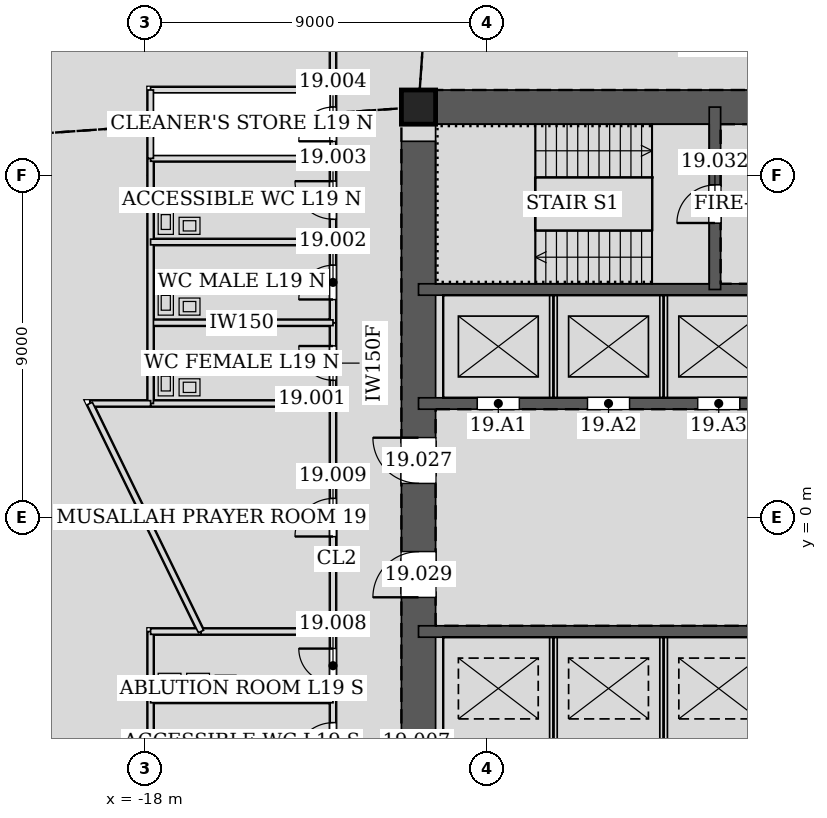
"""IFC4 building model, lengths in metres.
Left out: names, types, materials, properties, quantities, classifications, styles, units other than length and angle.
Written with IfcOpenShell. Run it as: python <this file> out.ifc"""

import sys

from ifc_helpers import new_model, si_unit, direction, frame, frame_2d, origin, origin_2d, place, context, subcontext, project, spatial, rectangle, hollow_rectangle, extrude, element, fill, save


model = new_model("IFC4")
c1 = context("Model", 3, precision=1e-05, world=origin(), true_north=direction((0.0, 1.0)))
c2 = subcontext(c1, "Body", "Model", "MODEL_VIEW")
j1 = project(units=[si_unit("LENGTHUNIT", "METRE"), si_unit("PLANEANGLEUNIT", "RADIAN")], contexts=[c1])
p1 = place(None, origin())
s1 = spatial("IfcSite", under=j1, at=p1, CompositionType="ELEMENT")
p2 = place(p1, origin())
s2 = spatial("IfcBuilding", under=s1, at=p2, CompositionType="ELEMENT")
p3 = place(p2, frame((0.0, 0.0, 87.6)))
s3 = spatial("IfcBuildingStorey", under=s2, at=p3, CompositionType="ELEMENT", Elevation=87.6)
p4 = place(p3, frame((-10.8, 10.8, 0.0), z_axis=(0.0, 0.0, 1.0), x_axis=(1.0, 0.0, 0.0)))
e1 = element("IfcColumn", 1, at=p4, inside=s3, PredefinedType="COLUMN", context=c2, shape_type="SweptSolid", body=[
    extrude(hollow_rectangle(XDim=0.9, YDim=0.9, WallThickness=0.06, at=origin_2d()), origin(), (0.0, 0.0, 1.0), 4.2),
])
p5 = place(p3, frame((10.8, 10.8, 0.0), z_axis=(0.0, 0.0, 1.0), x_axis=(-1.0, 0.0, 0.0)))
e2 = element("IfcWall", 2, at=p5, inside=s3, PredefinedType="SOLIDWALL", context=c2, shape_type="SweptSolid", body=[
    extrude(rectangle(XDim=21.6, YDim=0.9, at=frame_2d((10.8, 0.0))), origin(), (0.0, 0.0, 1.0), 4.2),
])
p6 = place(p5, frame((10.05, 0.0, 0.0)))
e3 = element("IfcOpeningElement", 3, at=p6, cuts=e2, PredefinedType="OPENING", context=c2, shape_type="SweptSolid", body=[
    extrude(rectangle(XDim=1.5, YDim=2.1, at=frame_2d((0.75, 1.05))), frame((0.0, 0.46, 0.0), z_axis=(0.0, -1.0, 0.0), x_axis=(1.0, 0.0, 0.0)), (0.0, 0.0, 1.0), 0.92),
])
p7 = place(p3, frame((-10.8, 10.8, 0.0), z_axis=(0.0, 0.0, 1.0), x_axis=(0.0, -1.0, 0.0)))
e4 = element("IfcWall", 4, at=p7, inside=s3, PredefinedType="SOLIDWALL", context=c2, shape_type="SweptSolid", body=[
    extrude(rectangle(XDim=21.6, YDim=0.9, at=frame_2d((10.8, 0.0))), origin(), (0.0, 0.0, 1.0), 4.2),
])
p8 = place(p7, frame((8.7, 0.0, 0.0)))
e5 = element("IfcOpeningElement", 5, at=p8, cuts=e4, PredefinedType="OPENING", context=c2, shape_type="SweptSolid", body=[
    extrude(rectangle(XDim=1.2, YDim=2.1, at=frame_2d((0.6, 1.05))), frame((0.0, 0.46, 0.0), z_axis=(0.0, -1.0, 0.0), x_axis=(1.0, 0.0, 0.0)), (0.0, 0.0, 1.0), 0.92),
])
p9 = place(p7, frame((11.7, 0.0, 0.0)))
e6 = element("IfcOpeningElement", 6, at=p9, cuts=e4, PredefinedType="OPENING", context=c2, shape_type="SweptSolid", body=[
    extrude(rectangle(XDim=1.2, YDim=2.1, at=frame_2d((0.6, 1.05))), frame((0.0, 0.46, 0.0), z_axis=(0.0, -1.0, 0.0), x_axis=(1.0, 0.0, 0.0)), (0.0, 0.0, 1.0), 0.92),
])
p10 = place(p3, frame((-10.8, 3.0, 0.0), z_axis=(0.0, 0.0, 1.0), x_axis=(1.0, 0.0, 0.0)))
e7 = element("IfcWall", 7, at=p10, inside=s3, PredefinedType="SOLIDWALL", context=c2, shape_type="SweptSolid", body=[
    extrude(rectangle(XDim=21.6, YDim=0.3, at=frame_2d((10.8, 0.0))), origin(), (0.0, 0.0, 1.0), 4.2),
])
p11 = place(p10, frame((1.55, 0.0, 0.0)))
e8 = element("IfcOpeningElement", 8, at=p11, cuts=e7, PredefinedType="OPENING", context=c2, shape_type="SweptSolid", body=[
    extrude(rectangle(XDim=1.1, YDim=2.1, at=frame_2d((0.55, 1.05))), frame((0.0, 0.16, 0.0), z_axis=(0.0, -1.0, 0.0), x_axis=(1.0, 0.0, 0.0)), (0.0, 0.0, 1.0), 0.32),
])
p12 = place(p10, frame((4.45, 0.0, 0.0)))
e9 = element("IfcOpeningElement", 9, at=p12, cuts=e7, PredefinedType="OPENING", context=c2, shape_type="SweptSolid", body=[
    extrude(rectangle(XDim=1.1, YDim=2.1, at=frame_2d((0.55, 1.05))), frame((0.0, 0.16, 0.0), z_axis=(0.0, -1.0, 0.0), x_axis=(1.0, 0.0, 0.0)), (0.0, 0.0, 1.0), 0.32),
])
p13 = place(p10, frame((7.35, 0.0, 0.0)))
e10 = element("IfcOpeningElement", 10, at=p13, cuts=e7, PredefinedType="OPENING", context=c2, shape_type="SweptSolid", body=[
    extrude(rectangle(XDim=1.1, YDim=2.1, at=frame_2d((0.55, 1.05))), frame((0.0, 0.16, 0.0), z_axis=(0.0, -1.0, 0.0), x_axis=(1.0, 0.0, 0.0)), (0.0, 0.0, 1.0), 0.32),
])
p14 = place(p10, frame((13.15, 0.0, 0.0)))
e11 = element("IfcOpeningElement", 11, at=p14, cuts=e7, PredefinedType="OPENING", context=c2, shape_type="SweptSolid", body=[
    extrude(rectangle(XDim=1.1, YDim=2.1, at=frame_2d((0.55, 1.05))), frame((0.0, 0.16, 0.0), z_axis=(0.0, -1.0, 0.0), x_axis=(1.0, 0.0, 0.0)), (0.0, 0.0, 1.0), 0.32),
])
p15 = place(p3, frame((-10.8, 6.0, 0.0), z_axis=(0.0, 0.0, 1.0), x_axis=(1.0, 0.0, 0.0)))
e12 = element("IfcWall", 12, at=p15, inside=s3, PredefinedType="SOLIDWALL", context=c2, shape_type="SweptSolid", body=[
    extrude(rectangle(XDim=21.6, YDim=0.3, at=frame_2d((10.8, 0.0))), origin(), (0.0, 0.0, 1.0), 4.2),
])
p16 = place(p15, frame((10.25, 0.0, 0.0)))
e13 = element("IfcOpeningElement", 13, at=p16, cuts=e12, PredefinedType="OPENING", context=c2, shape_type="SweptSolid", body=[
    extrude(rectangle(XDim=1.1, YDim=2.1, at=frame_2d((0.55, 1.05))), frame((0.0, 0.16, 0.0), z_axis=(0.0, -1.0, 0.0), x_axis=(1.0, 0.0, 0.0)), (0.0, 0.0, 1.0), 0.32),
])
p17 = place(p3, frame((-3.0, 6.0, 0.0), z_axis=(0.0, 0.0, 1.0), x_axis=(0.0, 1.0, 0.0)))
e14 = element("IfcWall", 14, at=p17, inside=s3, PredefinedType="SOLIDWALL", context=c2, shape_type="SweptSolid", body=[
    extrude(rectangle(XDim=4.8, YDim=0.3, at=frame_2d((2.4, 0.0))), origin(), (0.0, 0.0, 1.0), 4.2),
])
p18 = place(p17, frame((1.75, 0.0, 0.0)))
e15 = element("IfcOpeningElement", 15, at=p18, cuts=e14, PredefinedType="OPENING", context=c2, shape_type="SweptSolid", body=[
    extrude(rectangle(XDim=1.0, YDim=2.1, at=frame_2d((0.5, 1.05))), frame((0.0, 0.16, 0.0), z_axis=(0.0, -1.0, 0.0), x_axis=(1.0, 0.0, 0.0)), (0.0, 0.0, 1.0), 0.32),
])
p19 = place(p3, frame((-10.8, -3.0, 0.0), z_axis=(0.0, 0.0, 1.0), x_axis=(1.0, 0.0, 0.0)))
e16 = element("IfcWall", 16, at=p19, inside=s3, PredefinedType="SOLIDWALL", context=c2, shape_type="SweptSolid", body=[
    extrude(rectangle(XDim=21.6, YDim=0.3, at=frame_2d((10.8, 0.0))), origin(), (0.0, 0.0, 1.0), 4.2),
])
p20 = place(p3, frame((-13.05, 5.126, 0.0), z_axis=(0.0, 0.0, 1.0), x_axis=(0.0, -1.0, 0.0)))
e17 = element("IfcWall", 17, at=p20, inside=s3, PredefinedType="PARTITIONING", context=c2, shape_type="SweptSolid", body=[
    extrude(rectangle(XDim=2.127, YDim=0.15, at=frame_2d((1.063, 0.0))), origin(), (0.0, 0.0, 1.0), 4.035),
])
p21 = place(p20, frame((0.614, 0.0, 0.0)))
e18 = element("IfcOpeningElement", 18, at=p21, cuts=e17, PredefinedType="OPENING", context=c2, shape_type="SweptSolid", body=[
    extrude(rectangle(XDim=0.9, YDim=2.1, at=frame_2d((0.45, 1.05))), frame((0.0, 0.085, 0.0), z_axis=(0.0, -1.0, 0.0), x_axis=(1.0, 0.0, 0.0)), (0.0, 0.0, 1.0), 0.17),
])
p22 = place(p3, frame((-13.05, 7.251, 0.0), z_axis=(0.0, 0.0, 1.0), x_axis=(0.0, -1.0, 0.0)))
e19 = element("IfcWall", 19, at=p22, inside=s3, PredefinedType="PARTITIONING", context=c2, shape_type="SweptSolid", body=[
    extrude(rectangle(XDim=2.127, YDim=0.15, at=frame_2d((1.063, 0.0))), origin(), (0.0, 0.0, 1.0), 4.035),
])
p23 = place(p22, frame((0.614, 0.0, 0.0)))
e20 = element("IfcOpeningElement", 20, at=p23, cuts=e19, PredefinedType="OPENING", context=c2, shape_type="SweptSolid", body=[
    extrude(rectangle(XDim=0.9, YDim=2.1, at=frame_2d((0.45, 1.05))), frame((0.0, 0.085, 0.0), z_axis=(0.0, -1.0, 0.0), x_axis=(1.0, 0.0, 0.0)), (0.0, 0.0, 1.0), 0.17),
])
p24 = place(p3, frame((-13.05, 9.451, 0.0), z_axis=(0.0, 0.0, 1.0), x_axis=(0.0, -1.0, 0.0)))
e21 = element("IfcWall", 21, at=p24, inside=s3, PredefinedType="PARTITIONING", context=c2, shape_type="SweptSolid", body=[
    extrude(rectangle(XDim=2.202, YDim=0.15, at=frame_2d((1.101, 0.0))), origin(), (0.0, 0.0, 1.0), 4.035),
])
p25 = place(p24, frame((0.601, 0.0, 0.0)))
e22 = element("IfcOpeningElement", 22, at=p25, cuts=e21, PredefinedType="OPENING", context=c2, shape_type="SweptSolid", body=[
    extrude(rectangle(XDim=1.0, YDim=2.1, at=frame_2d((0.5, 1.05))), frame((0.0, 0.085, 0.0), z_axis=(0.0, -1.0, 0.0), x_axis=(1.0, 0.0, 0.0)), (0.0, 0.0, 1.0), 0.17),
])
p26 = place(p3, frame((-13.05, 11.251, 0.0), z_axis=(0.0, 0.0, 1.0), x_axis=(0.0, -1.0, 0.0)))
e23 = element("IfcWall", 23, at=p26, inside=s3, PredefinedType="PARTITIONING", context=c2, shape_type="SweptSolid", body=[
    extrude(rectangle(XDim=1.802, YDim=0.15, at=frame_2d((0.901, 0.0))), origin(), (0.0, 0.0, 1.0), 3.014),
])
p27 = place(p26, frame((0.451, 0.0, 0.0)))
e24 = element("IfcOpeningElement", 24, at=p27, cuts=e23, PredefinedType="OPENING", context=c2, shape_type="SweptSolid", body=[
    extrude(rectangle(XDim=0.9, YDim=2.1, at=frame_2d((0.45, 1.05))), frame((0.0, 0.085, 0.0), z_axis=(0.0, -1.0, 0.0), x_axis=(1.0, 0.0, 0.0)), (0.0, 0.0, 1.0), 0.17),
])
p28 = place(p3, frame((-13.05, -4.799, 0.0), z_axis=(0.0, 0.0, 1.0), x_axis=(0.0, -1.0, 0.0)))
e25 = element("IfcWall", 25, at=p28, inside=s3, PredefinedType="PARTITIONING", context=c2, shape_type="SweptSolid", body=[
    extrude(rectangle(XDim=2.202, YDim=0.15, at=frame_2d((1.101, 0.0))), origin(), (0.0, 0.0, 1.0), 4.035),
])
p29 = place(p28, frame((0.601, 0.0, 0.0)))
e26 = element("IfcOpeningElement", 26, at=p29, cuts=e25, PredefinedType="OPENING", context=c2, shape_type="SweptSolid", body=[
    extrude(rectangle(XDim=1.0, YDim=2.1, at=frame_2d((0.5, 1.05))), frame((0.0, 0.085, 0.0), z_axis=(0.0, -1.0, 0.0), x_axis=(1.0, 0.0, 0.0)), (0.0, 0.0, 1.0), 0.17),
])
p30 = place(p3, frame((-13.05, -2.999, 0.0), z_axis=(0.0, 0.0, 1.0), x_axis=(0.0, -1.0, 0.0)))
e27 = element("IfcWall", 27, at=p30, inside=s3, PredefinedType="PARTITIONING", context=c2, shape_type="SweptSolid", body=[
    extrude(rectangle(XDim=1.802, YDim=0.15, at=frame_2d((0.901, 0.0))), origin(), (0.0, 0.0, 1.0), 4.035),
])
p31 = place(p30, frame((0.451, 0.0, 0.0)))
e28 = element("IfcOpeningElement", 28, at=p31, cuts=e27, PredefinedType="OPENING", context=c2, shape_type="SweptSolid", body=[
    extrude(rectangle(XDim=0.9, YDim=2.1, at=frame_2d((0.45, 1.05))), frame((0.0, 0.085, 0.0), z_axis=(0.0, -1.0, 0.0), x_axis=(1.0, 0.0, 0.0)), (0.0, 0.0, 1.0), 0.17),
])
p32 = place(p3, frame((-13.05, 3.001, 0.0), z_axis=(0.0, 0.0, 1.0), x_axis=(0.0, -1.0, 0.0)))
e29 = element("IfcWall", 29, at=p32, inside=s3, PredefinedType="PARTITIONING", context=c2, shape_type="SweptSolid", body=[
    extrude(rectangle(XDim=6.002, YDim=0.15, at=frame_2d((3.001, 0.0))), origin(), (0.0, 0.0, 1.0), 3.065),
])
p33 = place(p32, frame((2.501, 0.0, 0.0)))
e30 = element("IfcOpeningElement", 30, at=p33, cuts=e29, PredefinedType="OPENING", context=c2, shape_type="SweptSolid", body=[
    extrude(rectangle(XDim=1.0, YDim=2.1, at=frame_2d((0.5, 1.05))), frame((0.0, 0.085, 0.0), z_axis=(0.0, -1.0, 0.0), x_axis=(1.0, 0.0, 0.0)), (0.0, 0.0, 1.0), 0.17),
])
p34 = place(p3, frame((-13.05, 13.05, 0.0), z_axis=(0.0, 0.0, 1.0), x_axis=(0.0, -1.0, 0.0)))
e31 = element("IfcWall", 31, at=p34, inside=s3, PredefinedType="PARTITIONING", context=c2, shape_type="SweptSolid", body=[
    extrude(rectangle(XDim=1.801, YDim=0.15, at=frame_2d((0.9, 0.0))), origin(), (0.0, 0.0, 1.0), 3.179),
])
for number, where, z_axis, x_axis in (
    (32, (-13.05, 5.125, 0.0), (0.0, 0.0, 1.0), (-1.0, 0.0, 0.0)),
    (33, (-17.85, 3.0, 0.0), (0.0, 0.0, 1.0), (1.0, 0.0, 0.0)),
):
    element("IfcWall", number, at=place(p3, frame(where, z_axis=z_axis, x_axis=x_axis)), inside=s3, PredefinedType="PARTITIONING", context=c2, shape_type="SweptSolid", body=[
        extrude(rectangle(XDim=4.8, YDim=0.15, at=frame_2d((2.4, 0.0))), origin(), (0.0, 0.0, 1.0), 3.491),
    ])
p35 = place(p3, frame((-17.85, 3.0, 0.0), z_axis=(0.0, 0.0, 1.0), x_axis=(0.0, 1.0, 0.0)))
e34 = element("IfcWall", 34, at=p35, inside=s3, PredefinedType="PARTITIONING", context=c2, shape_type="SweptSolid", body=[
    extrude(rectangle(XDim=6.45, YDim=0.15, at=frame_2d((3.225, 0.0))), origin(), (0.0, 0.0, 1.0), 4.035),
])
for number, where, z_axis, x_axis in (
    (35, (-13.05, 7.25, 0.0), (0.0, 0.0, 1.0), (-1.0, 0.0, 0.0)),
    (36, (-13.05, 9.45, 0.0), (0.0, 0.0, 1.0), (-1.0, 0.0, 0.0)),
):
    element("IfcWall", number, at=place(p3, frame(where, z_axis=z_axis, x_axis=x_axis)), inside=s3, PredefinedType="PARTITIONING", context=c2, shape_type="SweptSolid", body=[
        extrude(rectangle(XDim=4.8, YDim=0.15, at=frame_2d((2.4, 0.0))), origin(), (0.0, 0.0, 1.0), 3.491),
    ])
p36 = place(p3, frame((-13.05, 11.25, 0.0), z_axis=(0.0, 0.0, 1.0), x_axis=(-1.0, 0.0, 0.0)))
e37 = element("IfcWall", 37, at=p36, inside=s3, PredefinedType="PARTITIONING", context=c2, shape_type="SweptSolid", body=[
    extrude(rectangle(XDim=4.8, YDim=0.15, at=frame_2d((2.4, 0.0))), origin(), (0.0, 0.0, 1.0), 3.715),
])
p37 = place(p3, frame((-17.85, 11.25, 0.0), z_axis=(0.0, 0.0, 1.0), x_axis=(0.0, -1.0, 0.0)))
e38 = element("IfcWall", 38, at=p37, inside=s3, PredefinedType="PARTITIONING", context=c2, shape_type="SweptSolid", body=[
    extrude(rectangle(XDim=1.8, YDim=0.15, at=frame_2d((0.9, 0.0))), origin(), (0.0, 0.0, 1.0), 3.014),
])
p38 = place(p3, frame((-17.85, -9.125, 0.0), z_axis=(0.0, 0.0, 1.0), x_axis=(0.0, 1.0, 0.0)))
e39 = element("IfcWall", 39, at=p38, inside=s3, PredefinedType="PARTITIONING", context=c2, shape_type="SweptSolid", body=[
    extrude(rectangle(XDim=6.125, YDim=0.15, at=frame_2d((3.062, 0.0))), origin(), (0.0, 0.0, 1.0), 4.035),
])
p39 = place(p3, frame((-13.05, -4.8, 0.0), z_axis=(0.0, 0.0, 1.0), x_axis=(-1.0, 0.0, 0.0)))
e40 = element("IfcWall", 40, at=p39, inside=s3, PredefinedType="PARTITIONING", context=c2, shape_type="SweptSolid", body=[
    extrude(rectangle(XDim=4.8, YDim=0.15, at=frame_2d((2.4, 0.0))), origin(), (0.0, 0.0, 1.0), 3.491),
])
p40 = place(p3, frame((-13.05, -3.0, 0.0), z_axis=(0.0, 0.0, 1.0), x_axis=(-1.0, 0.0, 0.0)))
e41 = element("IfcWall", 41, at=p40, inside=s3, PredefinedType="PARTITIONING", context=c2, shape_type="SweptSolid", body=[
    extrude(rectangle(XDim=3.475, YDim=0.15, at=frame_2d((1.737, 0.0))), origin(), (0.0, 0.0, 1.0), 3.491),
])
p41 = place(p3, frame((-16.522, -3.0, 0.0), z_axis=(0.0, 0.0, 1.0), x_axis=(-1.0, 0.0, 0.0)))
e42 = element("IfcWall", 42, at=p41, inside=s3, PredefinedType="PARTITIONING", context=c2, shape_type="SweptSolid", body=[
    extrude(rectangle(XDim=1.328, YDim=0.15, at=frame_2d((0.664, 0.0))), origin(), (0.0, 0.0, 1.0), 4.035),
])
p42 = place(p3, frame((-17.849, 3.0, 0.0), z_axis=(0.0, 0.0, 1.0), x_axis=(-1.0, 0.0, 0.0)))
e43 = element("IfcWall", 43, at=p42, inside=s3, PredefinedType="PARTITIONING", context=c2, shape_type="SweptSolid", body=[
    extrude(rectangle(XDim=1.601, YDim=0.15, at=frame_2d((0.8, 0.0))), origin(), (0.0, 0.0, 1.0), 3.497),
])
p43 = place(p3, frame((-19.45, 3.0, 0.0), z_axis=(0.0, 0.0, 1.0), x_axis=(0.43835589904, -0.898801482963, 0.0)))
e44 = element("IfcWall", 44, at=p43, inside=s3, PredefinedType="PARTITIONING", context=c2, shape_type="SweptSolid", body=[
    extrude(rectangle(XDim=6.676, YDim=0.15, at=frame_2d((3.338, 0.0))), origin(), (0.0, 0.0, 1.0), 3.065),
])
for number, where, z_axis, x_axis in (
    (45, (-7.25, 3.15, 0.0), (0.0, 0.0, 1.0), (0.0, 1.0, 0.0)),
    (46, (-4.35, 3.15, 0.0), (0.0, 0.0, 1.0), (0.0, 1.0, 0.0)),
    (47, (-7.25, -5.85, 0.0), (0.0, 0.0, 1.0), (0.0, 1.0, 0.0)),
    (48, (-4.35, -5.85, 0.0), (0.0, 0.0, 1.0), (0.0, 1.0, 0.0)),
):
    element("IfcWall", number, at=place(p3, frame(where, z_axis=z_axis, x_axis=x_axis)), inside=s3, PredefinedType="PARTITIONING", context=c2, shape_type="SweptSolid", body=[
        extrude(rectangle(XDim=2.7, YDim=0.2, at=frame_2d((1.35, 0.0))), origin(), (0.0, 0.0, 1.0), 4.2),
    ])
p44 = place(p21, frame((0.9, 0.0, 0.0), z_axis=(0.0, 0.0, 1.0), x_axis=(-1.0, 0.0, 0.0)))
e49 = element("IfcDoor", 49, at=p44, inside=s3, OperationType="SINGLE_SWING_RIGHT", PredefinedType="DOOR", context=c2, shape_type="SweptSolid", body=[
    extrude(rectangle(XDim=0.9, YDim=2.1, at=frame_2d((0.45, 1.05))), frame((0.0, 0.025, 0.0), z_axis=(0.0, -1.0, 0.0), x_axis=(1.0, 0.0, 0.0)), (0.0, 0.0, 1.0), 0.05),
])
fill(e18, e49)
p45 = place(p23, frame((0.9, 0.0, 0.0), z_axis=(0.0, 0.0, 1.0), x_axis=(-1.0, 0.0, 0.0)))
e50 = element("IfcDoor", 50, at=p45, inside=s3, OperationType="SINGLE_SWING_LEFT", PredefinedType="DOOR", context=c2, shape_type="SweptSolid", body=[
    extrude(rectangle(XDim=0.9, YDim=2.1, at=frame_2d((0.45, 1.05))), frame((0.0, 0.025, 0.0), z_axis=(0.0, -1.0, 0.0), x_axis=(1.0, 0.0, 0.0)), (0.0, 0.0, 1.0), 0.05),
])
fill(e20, e50)
p46 = place(p25, frame((1.0, 0.0, 0.0), z_axis=(0.0, 0.0, 1.0), x_axis=(-1.0, 0.0, 0.0)))
e51 = element("IfcDoor", 51, at=p46, inside=s3, OperationType="SINGLE_SWING_RIGHT", PredefinedType="DOOR", context=c2, shape_type="SweptSolid", body=[
    extrude(rectangle(XDim=1.0, YDim=2.1, at=frame_2d((0.5, 1.05))), frame((0.0, 0.025, 0.0), z_axis=(0.0, -1.0, 0.0), x_axis=(1.0, 0.0, 0.0)), (0.0, 0.0, 1.0), 0.05),
])
fill(e22, e51)
p47 = place(p27, frame((0.9, 0.0, 0.0), z_axis=(0.0, 0.0, 1.0), x_axis=(-1.0, 0.0, 0.0)))
e52 = element("IfcDoor", 52, at=p47, inside=s3, OperationType="SINGLE_SWING_LEFT", PredefinedType="DOOR", context=c2, shape_type="SweptSolid", body=[
    extrude(rectangle(XDim=0.9, YDim=2.1, at=frame_2d((0.45, 1.05))), frame((0.0, 0.025, 0.0), z_axis=(0.0, -1.0, 0.0), x_axis=(1.0, 0.0, 0.0)), (0.0, 0.0, 1.0), 0.05),
])
fill(e24, e52)
p48 = place(p29, frame((1.0, 0.0, 0.0), z_axis=(0.0, 0.0, 1.0), x_axis=(-1.0, 0.0, 0.0)))
e53 = element("IfcDoor", 53, at=p48, inside=s3, OperationType="SINGLE_SWING_LEFT", PredefinedType="DOOR", context=c2, shape_type="SweptSolid", body=[
    extrude(rectangle(XDim=1.0, YDim=2.1, at=frame_2d((0.5, 1.05))), frame((0.0, 0.025, 0.0), z_axis=(0.0, -1.0, 0.0), x_axis=(1.0, 0.0, 0.0)), (0.0, 0.0, 1.0), 0.05),
])
fill(e26, e53)
p49 = place(p31, frame((0.9, 0.0, 0.0), z_axis=(0.0, 0.0, 1.0), x_axis=(-1.0, 0.0, 0.0)))
e54 = element("IfcDoor", 54, at=p49, inside=s3, OperationType="SINGLE_SWING_RIGHT", PredefinedType="DOOR", context=c2, shape_type="SweptSolid", body=[
    extrude(rectangle(XDim=0.9, YDim=2.1, at=frame_2d((0.45, 1.05))), frame((0.0, 0.025, 0.0), z_axis=(0.0, -1.0, 0.0), x_axis=(1.0, 0.0, 0.0)), (0.0, 0.0, 1.0), 0.05),
])
fill(e28, e54)
p50 = place(p33, frame((1.0, 0.0, 0.0), z_axis=(0.0, 0.0, 1.0), x_axis=(-1.0, 0.0, 0.0)))
e55 = element("IfcDoor", 55, at=p50, inside=s3, OperationType="SINGLE_SWING_LEFT", PredefinedType="DOOR", context=c2, shape_type="SweptSolid", body=[
    extrude(rectangle(XDim=1.0, YDim=2.1, at=frame_2d((0.5, 1.05))), frame((0.0, 0.025, 0.0), z_axis=(0.0, -1.0, 0.0), x_axis=(1.0, 0.0, 0.0)), (0.0, 0.0, 1.0), 0.05),
])
fill(e30, e55)
p51 = place(p8, frame((1.2, 0.0, 0.0), z_axis=(0.0, 0.0, 1.0), x_axis=(-1.0, 0.0, 0.0)))
e56 = element("IfcDoor", 56, at=p51, inside=s3, OperationType="SINGLE_SWING_RIGHT", PredefinedType="DOOR", context=c2, shape_type="SweptSolid", body=[
    extrude(rectangle(XDim=1.2, YDim=2.1, at=frame_2d((0.6, 1.05))), frame((0.0, 0.025, 0.0), z_axis=(0.0, -1.0, 0.0), x_axis=(1.0, 0.0, 0.0)), (0.0, 0.0, 1.0), 0.05),
])
fill(e5, e56)
p52 = place(p9, frame((1.2, 0.0, 0.0), z_axis=(0.0, 0.0, 1.0), x_axis=(-1.0, 0.0, 0.0)))
e57 = element("IfcDoor", 57, at=p52, inside=s3, OperationType="SINGLE_SWING_LEFT", PredefinedType="DOOR", context=c2, shape_type="SweptSolid", body=[
    extrude(rectangle(XDim=1.2, YDim=2.1, at=frame_2d((0.6, 1.05))), frame((0.0, 0.025, 0.0), z_axis=(0.0, -1.0, 0.0), x_axis=(1.0, 0.0, 0.0)), (0.0, 0.0, 1.0), 0.05),
])
fill(e6, e57)
p53 = place(p18, origin())
e58 = element("IfcDoor", 58, at=p53, inside=s3, OperationType="SINGLE_SWING_LEFT", PredefinedType="DOOR", context=c2, shape_type="SweptSolid", body=[
    extrude(rectangle(XDim=1.0, YDim=2.1, at=frame_2d((0.5, 1.05))), frame((0.0, 0.025, 0.0), z_axis=(0.0, -1.0, 0.0), x_axis=(1.0, 0.0, 0.0)), (0.0, 0.0, 1.0), 0.05),
])
fill(e15, e58)
p54 = place(p11, origin())
e59 = element("IfcDoor", 59, at=p54, inside=s3, OperationType="DOUBLE_DOOR_SLIDING", PredefinedType="DOOR", context=c2, shape_type="SweptSolid", body=[
    extrude(rectangle(XDim=1.1, YDim=2.1, at=frame_2d((0.55, 1.05))), frame((0.0, 0.025, 0.0), z_axis=(0.0, -1.0, 0.0), x_axis=(1.0, 0.0, 0.0)), (0.0, 0.0, 1.0), 0.05),
])
fill(e8, e59)
p55 = place(p12, origin())
e60 = element("IfcDoor", 60, at=p55, inside=s3, OperationType="DOUBLE_DOOR_SLIDING", PredefinedType="DOOR", context=c2, shape_type="SweptSolid", body=[
    extrude(rectangle(XDim=1.1, YDim=2.1, at=frame_2d((0.55, 1.05))), frame((0.0, 0.025, 0.0), z_axis=(0.0, -1.0, 0.0), x_axis=(1.0, 0.0, 0.0)), (0.0, 0.0, 1.0), 0.05),
])
fill(e9, e60)
p56 = place(p13, origin())
e61 = element("IfcDoor", 61, at=p56, inside=s3, OperationType="DOUBLE_DOOR_SLIDING", PredefinedType="DOOR", context=c2, shape_type="SweptSolid", body=[
    extrude(rectangle(XDim=1.1, YDim=2.1, at=frame_2d((0.55, 1.05))), frame((0.0, 0.025, 0.0), z_axis=(0.0, -1.0, 0.0), x_axis=(1.0, 0.0, 0.0)), (0.0, 0.0, 1.0), 0.05),
])
fill(e10, e61)
save(model, sys.argv[1])
